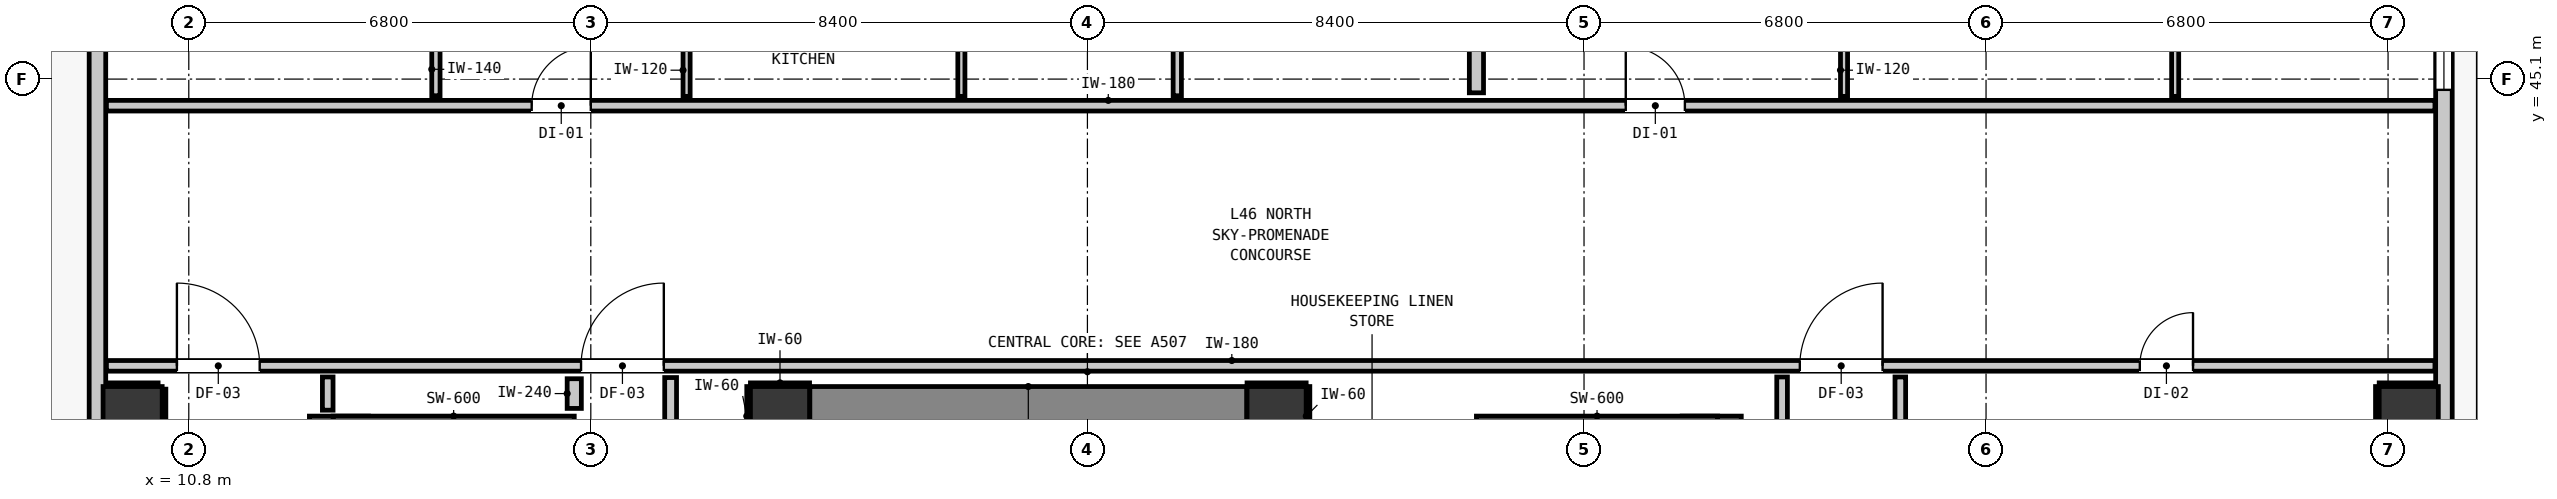
"""IFC4 building model, lengths in metres.
Left out: names, types, materials, properties, quantities, classifications, styles, units other than length and angle.
Written with IfcOpenShell. Run it as: python <this file> out.ifc"""

import sys

from ifc_helpers import new_model, si_unit, direction, frame, frame_2d, origin, origin_2d, place, context, subcontext, project, spatial, rectangle, extrude, element, fill, save


model = new_model("IFC4")
c1 = context("Model", 3, precision=1e-05, world=origin(), true_north=direction((0.0, 1.0)))
c2 = subcontext(c1, "Body", "Model", "MODEL_VIEW")
j1 = project(units=[si_unit("LENGTHUNIT", "METRE"), si_unit("PLANEANGLEUNIT", "RADIAN")], contexts=[c1])
p1 = place(None, origin())
s1 = spatial("IfcSite", under=j1, at=p1, CompositionType="ELEMENT")
p2 = place(p1, origin())
s2 = spatial("IfcBuilding", under=s1, at=p2, CompositionType="ELEMENT")
p3 = place(p2, frame((0.0, 0.0, 159.2)))
s3 = spatial("IfcBuildingStorey", under=s2, at=p3, CompositionType="ELEMENT", Elevation=159.2)
for number, where, z_axis, x_axis in (
    (1, (20.8, 39.4, 0.0), (0.0, 0.0, 1.0), (1.0, 0.0, 0.0)),
    (2, (29.2, 39.4, 0.0), (0.0, 0.0, 1.0), (1.0, 0.0, 0.0)),
):
    element("IfcColumn", number, at=place(p3, frame(where, z_axis=z_axis, x_axis=x_axis)), inside=s3, PredefinedType="COLUMN", context=c2, shape_type="SweptSolid", body=[
        extrude(rectangle(XDim=1.0, YDim=1.0, at=origin_2d()), origin(), (0.0, 0.0, 1.0), 3.32),
    ])
p4 = place(p3, frame((13.34, 31.205, 0.0), z_axis=(0.0, 0.0, 1.0), x_axis=(0.0, 1.0, 0.0)))
e3 = element("IfcWall", 3, at=p4, inside=s3, PredefinedType="SHEAR", context=c2, shape_type="SweptSolid", body=[
    extrude(rectangle(XDim=8.195, YDim=1.0, at=frame_2d((4.097, 0.0))), origin(), (0.0, 0.0, 1.0), 3.32),
])
p5 = place(p3, frame((13.24, 39.1, 0.0), z_axis=(0.0, 0.0, 1.0), x_axis=(1.0, 0.0, 0.0)))
e4 = element("IfcWall", 4, at=p5, inside=s3, PredefinedType="SHEAR", context=c2, shape_type="SweptSolid", body=[
    extrude(rectangle(XDim=4.08, YDim=0.6, at=frame_2d((2.04, 0.0))), origin(), (0.0, 0.0, 1.0), 3.32),
])
p6 = place(p3, frame((36.56, 31.205, 0.0), z_axis=(0.0, 0.0, 1.0), x_axis=(0.0, 1.0, 0.0)))
e5 = element("IfcWall", 5, at=p6, inside=s3, PredefinedType="SHEAR", context=c2, shape_type="SweptSolid", body=[
    extrude(rectangle(XDim=8.195, YDim=1.0, at=frame_2d((4.097, 0.0))), origin(), (0.0, 0.0, 1.0), 3.32),
])
p7 = place(p3, frame((32.58, 39.1, 0.0), z_axis=(0.0, 0.0, 1.0), x_axis=(1.0, 0.0, 0.0)))
e6 = element("IfcWall", 6, at=p7, inside=s3, PredefinedType="SHEAR", context=c2, shape_type="SweptSolid", body=[
    extrude(rectangle(XDim=4.08, YDim=0.6, at=frame_2d((2.04, 0.0))), origin(), (0.0, 0.0, 1.0), 3.32),
])
p8 = place(p3, frame((21.305, 39.4, 0.0), z_axis=(0.0, 0.0, 1.0), x_axis=(1.0, 0.0, 0.0)))
e7 = element("IfcWall", 7, at=p8, inside=s3, PredefinedType="SHEAR", context=c2, shape_type="SweptSolid", body=[
    extrude(rectangle(XDim=7.39, YDim=1.0, at=frame_2d((3.695, 0.0))), origin(), (0.0, 0.0, 1.0), 3.32),
])
for number, where, z_axis, x_axis in (
    (8, (9.85, 39.4, 0.0), (0.0, 0.0, 1.0), (1.0, 0.0, 0.0)),
    (9, (48.35, 39.4, 0.0), (0.0, 0.0, 1.0), (1.0, 0.0, 0.0)),
):
    element("IfcColumn", number, at=place(p3, frame(where, z_axis=z_axis, x_axis=x_axis)), inside=s3, PredefinedType="COLUMN", context=c2, shape_type="SweptSolid", body=[
        extrude(rectangle(XDim=1.0, YDim=1.0, at=origin_2d()), origin(), (0.0, 0.0, 1.0), 3.32),
    ])
p9 = place(p3, frame((9.255, 17.555, 0.0), z_axis=(0.0, 0.0, 1.0), x_axis=(0.0, 1.0, 0.0)))
e10 = element("IfcWall", 10, at=p9, inside=s3, PredefinedType="STANDARD", context=c2, shape_type="SweptSolid", body=[
    extrude(rectangle(XDim=32.29, YDim=0.28, at=frame_2d((16.145, 0.0))), origin(), (0.0, 0.0, 1.0), 3.08),
])
p10 = place(p9, frame((5.467, 0.0, 0.0)))
e11 = element("IfcOpeningElement", 11, at=p10, cuts=e10, PredefinedType="OPENING", context=c2, shape_type="SweptSolid", body=[
    extrude(rectangle(XDim=1.0, YDim=2.15, at=frame_2d((0.5, 1.075))), frame((0.0, 0.15, 0.0), z_axis=(0.0, -1.0, 0.0), x_axis=(1.0, 0.0, 0.0)), (0.0, 0.0, 1.0), 0.3),
])
p11 = place(p9, frame((0.417, 0.0, 0.85)))
e12 = element("IfcOpeningElement", 12, at=p11, cuts=e10, PredefinedType="OPENING", context=c2, shape_type="SweptSolid", body=[
    extrude(rectangle(XDim=1.05, YDim=1.65, at=frame_2d((0.525, 0.825))), frame((0.0, 0.15, 0.0), z_axis=(0.0, -1.0, 0.0), x_axis=(1.0, 0.0, 0.0)), (0.0, 0.0, 1.0), 0.3),
])
p12 = place(p9, frame((30.753, 0.0, 0.85)))
e13 = element("IfcOpeningElement", 13, at=p12, cuts=e10, PredefinedType="OPENING", context=c2, shape_type="SweptSolid", body=[
    extrude(rectangle(XDim=1.05, YDim=1.65, at=frame_2d((0.525, 0.825))), frame((0.0, 0.15, 0.0), z_axis=(0.0, -1.0, 0.0), x_axis=(1.0, 0.0, 0.0)), (0.0, 0.0, 1.0), 0.3),
])
p13 = place(p3, frame((48.945, 49.845, 0.0), z_axis=(0.0, 0.0, 1.0), x_axis=(0.0, -1.0, 0.0)))
e14 = element("IfcWall", 14, at=p13, inside=s3, PredefinedType="STANDARD", context=c2, shape_type="SweptSolid", body=[
    extrude(rectangle(XDim=32.29, YDim=0.28, at=frame_2d((16.145, 0.0))), origin(), (0.0, 0.0, 1.0), 3.08),
])
p14 = place(p13, frame((2.659, 0.0, 0.0)))
e15 = element("IfcOpeningElement", 15, at=p14, cuts=e14, PredefinedType="OPENING", context=c2, shape_type="SweptSolid", body=[
    extrude(rectangle(XDim=1.0, YDim=2.15, at=frame_2d((0.5, 1.075))), frame((0.0, 0.15, 0.0), z_axis=(0.0, -1.0, 0.0), x_axis=(1.0, 0.0, 0.0)), (0.0, 0.0, 1.0), 0.3),
])
p15 = place(p13, frame((30.822, 0.0, 0.85)))
e16 = element("IfcOpeningElement", 16, at=p15, cuts=e14, PredefinedType="OPENING", context=c2, shape_type="SweptSolid", body=[
    extrude(rectangle(XDim=1.05, YDim=1.65, at=frame_2d((0.525, 0.825))), frame((0.0, 0.15, 0.0), z_axis=(0.0, -1.0, 0.0), x_axis=(1.0, 0.0, 0.0)), (0.0, 0.0, 1.0), 0.3),
])
p16 = place(p13, frame((4.027, 0.0, 0.85)))
e17 = element("IfcOpeningElement", 17, at=p16, cuts=e14, PredefinedType="OPENING", context=c2, shape_type="SweptSolid", body=[
    extrude(rectangle(XDim=0.9, YDim=1.5, at=frame_2d((0.45, 0.75))), frame((0.0, 0.15, 0.0), z_axis=(0.0, -1.0, 0.0), x_axis=(1.0, 0.0, 0.0)), (0.0, 0.0, 1.0), 0.3),
])
p17 = place(p13, frame((0.487, 0.0, 0.85)))
e18 = element("IfcOpeningElement", 18, at=p17, cuts=e14, PredefinedType="OPENING", context=c2, shape_type="SweptSolid", body=[
    extrude(rectangle(XDim=1.05, YDim=1.65, at=frame_2d((0.525, 0.825))), frame((0.0, 0.15, 0.0), z_axis=(0.0, -1.0, 0.0), x_axis=(1.0, 0.0, 0.0)), (0.0, 0.0, 1.0), 0.3),
])
p18 = place(p13, frame((21.995, 0.0, 0.85)))
e19 = element("IfcOpeningElement", 19, at=p18, cuts=e14, PredefinedType="OPENING", context=c2, shape_type="SweptSolid", body=[
    extrude(rectangle(XDim=3.0, YDim=2.1, at=frame_2d((1.5, 1.05))), frame((0.0, 0.15, 0.0), z_axis=(0.0, -1.0, 0.0), x_axis=(1.0, 0.0, 0.0)), (0.0, 0.0, 1.0), 0.3),
])
p19 = place(p3, frame((9.407, 40.25, 0.0), z_axis=(0.0, 0.0, 1.0), x_axis=(1.0, 0.0, 0.0)))
e20 = element("IfcWall", 20, at=p19, inside=s3, PredefinedType="PARTITIONING", context=c2, shape_type="SweptSolid", body=[
    extrude(rectangle(XDim=39.386, YDim=0.18, at=frame_2d((19.693, 0.0))), origin(), (0.0, 0.0, 1.0), 3.08),
])
p20 = place(p19, frame((8.028, 0.0, 0.0)))
e21 = element("IfcOpeningElement", 21, at=p20, cuts=e20, PredefinedType="OPENING", context=c2, shape_type="SweptSolid", body=[
    extrude(rectangle(XDim=1.4, YDim=2.15, at=frame_2d((0.7, 1.075))), frame((0.0, 0.1, 0.0), z_axis=(0.0, -1.0, 0.0), x_axis=(1.0, 0.0, 0.0)), (0.0, 0.0, 1.0), 0.2),
])
p21 = place(p19, frame((1.192, 0.0, 0.0)))
e22 = element("IfcOpeningElement", 22, at=p21, cuts=e20, PredefinedType="OPENING", context=c2, shape_type="SweptSolid", body=[
    extrude(rectangle(XDim=1.4, YDim=2.15, at=frame_2d((0.7, 1.075))), frame((0.0, 0.1, 0.0), z_axis=(0.0, -1.0, 0.0), x_axis=(1.0, 0.0, 0.0)), (0.0, 0.0, 1.0), 0.2),
])
p22 = place(p19, frame((28.643, 0.0, 0.0)))
e23 = element("IfcOpeningElement", 23, at=p22, cuts=e20, PredefinedType="OPENING", context=c2, shape_type="SweptSolid", body=[
    extrude(rectangle(XDim=1.4, YDim=2.15, at=frame_2d((0.7, 1.075))), frame((0.0, 0.1, 0.0), z_axis=(0.0, -1.0, 0.0), x_axis=(1.0, 0.0, 0.0)), (0.0, 0.0, 1.0), 0.2),
])
p23 = place(p19, frame((34.394, 0.0, 0.0)))
e24 = element("IfcOpeningElement", 24, at=p23, cuts=e20, PredefinedType="OPENING", context=c2, shape_type="SweptSolid", body=[
    extrude(rectangle(XDim=0.9, YDim=2.1, at=frame_2d((0.45, 1.05))), frame((0.0, 0.1, 0.0), z_axis=(0.0, -1.0, 0.0), x_axis=(1.0, 0.0, 0.0)), (0.0, 0.0, 1.0), 0.2),
])
p24 = place(p3, frame((9.407, 44.65, 0.0), z_axis=(0.0, 0.0, 1.0), x_axis=(1.0, 0.0, 0.0)))
e25 = element("IfcWall", 25, at=p24, inside=s3, PredefinedType="PARTITIONING", context=c2, shape_type="SweptSolid", body=[
    extrude(rectangle(XDim=39.386, YDim=0.18, at=frame_2d((19.693, 0.0))), origin(), (0.0, 0.0, 1.0), 3.08),
])
p25 = place(p24, frame((7.193, 0.0, 0.0)))
e26 = element("IfcOpeningElement", 26, at=p25, cuts=e25, PredefinedType="OPENING", context=c2, shape_type="SweptSolid", body=[
    extrude(rectangle(XDim=1.0, YDim=2.15, at=frame_2d((0.5, 1.075))), frame((0.0, 0.1, 0.0), z_axis=(0.0, -1.0, 0.0), x_axis=(1.0, 0.0, 0.0)), (0.0, 0.0, 1.0), 0.2),
])
p26 = place(p24, frame((25.699, 0.0, 0.0)))
e27 = element("IfcOpeningElement", 27, at=p26, cuts=e25, PredefinedType="OPENING", context=c2, shape_type="SweptSolid", body=[
    extrude(rectangle(XDim=1.0, YDim=2.15, at=frame_2d((0.5, 1.075))), frame((0.0, 0.1, 0.0), z_axis=(0.0, -1.0, 0.0), x_axis=(1.0, 0.0, 0.0)), (0.0, 0.0, 1.0), 0.2),
])
p27 = place(p3, frame((17.32, 39.53, 0.0), z_axis=(0.0, 0.0, 1.0), x_axis=(0.0, 1.0, 0.0)))
e28 = element("IfcWall", 28, at=p27, inside=s3, PredefinedType="PARTITIONING", context=c2, shape_type="SweptSolid", body=[
    extrude(rectangle(XDim=0.502, YDim=0.24, at=frame_2d((0.251, 0.0))), origin(), (0.0, 0.0, 1.0), 3.08),
])
p28 = place(p3, frame((32.58, 44.868, 0.0), z_axis=(0.0, 0.0, 1.0), x_axis=(0.0, 1.0, 0.0)))
e29 = element("IfcWall", 29, at=p28, inside=s3, PredefinedType="PARTITIONING", context=c2, shape_type="SweptSolid", body=[
    extrude(rectangle(XDim=7.125, YDim=0.24, at=frame_2d((3.562, 0.0))), origin(), (0.0, 0.0, 1.0), 3.08),
])
p29 = place(p28, frame((0.945, 0.0, 0.0)))
e30 = element("IfcOpeningElement", 30, at=p29, cuts=e29, PredefinedType="OPENING", context=c2, shape_type="SweptSolid", body=[
    extrude(rectangle(XDim=0.86, YDim=2.02, at=frame_2d((0.43, 1.01))), frame((0.0, 0.13, 0.0), z_axis=(0.0, -1.0, 0.0), x_axis=(1.0, 0.0, 0.0)), (0.0, 0.0, 1.0), 0.26),
])
p30 = place(p28, frame((4.574, 0.0, 0.0)))
e31 = element("IfcOpeningElement", 31, at=p30, cuts=e29, PredefinedType="OPENING", context=c2, shape_type="SweptSolid", body=[
    extrude(rectangle(XDim=0.9, YDim=2.1, at=frame_2d((0.45, 1.05))), frame((0.0, 0.13, 0.0), z_axis=(0.0, -1.0, 0.0), x_axis=(1.0, 0.0, 0.0)), (0.0, 0.0, 1.0), 0.26),
])
p31 = place(p3, frame((18.95, 38.918, 0.0), z_axis=(0.0, 0.0, 1.0), x_axis=(0.0, 1.0, 0.0)))
e32 = element("IfcWall", 32, at=p31, inside=s3, PredefinedType="PARTITIONING", context=c2, shape_type="SweptSolid", body=[
    extrude(rectangle(XDim=1.134, YDim=0.2, at=frame_2d((0.567, 0.0))), origin(), (0.0, 0.0, 1.0), 3.08),
])
p32 = place(p3, frame((13.15, 39.5, 0.0), z_axis=(0.0, 0.0, 1.0), x_axis=(0.0, 1.0, 0.0)))
e33 = element("IfcWall", 33, at=p32, inside=s3, PredefinedType="PARTITIONING", context=c2, shape_type="SweptSolid", body=[
    extrude(rectangle(XDim=0.562, YDim=0.18, at=frame_2d((0.281, 0.0))), origin(), (0.0, 0.0, 1.0), 2.315),
])
p33 = place(p3, frame((37.75, 21.368, 0.0), z_axis=(0.0, 0.0, 1.0), x_axis=(0.0, 1.0, 0.0)))
e34 = element("IfcWall", 34, at=p33, inside=s3, PredefinedType="PARTITIONING", context=c2, shape_type="SweptSolid", body=[
    extrude(rectangle(XDim=18.694, YDim=0.18, at=frame_2d((9.347, 0.0))), origin(), (0.0, 0.0, 1.0), 3.08),
])
p34 = place(p3, frame((39.75, 36.238, 0.0), z_axis=(0.0, 0.0, 1.0), x_axis=(0.0, 1.0, 0.0)))
e35 = element("IfcWall", 35, at=p34, inside=s3, PredefinedType="PARTITIONING", context=c2, shape_type="SweptSolid", body=[
    extrude(rectangle(XDim=3.824, YDim=0.18, at=frame_2d((1.912, 0.0))), origin(), (0.0, 0.0, 1.0), 3.08),
])
p35 = place(p3, frame((14.98, 44.818, 0.0), z_axis=(0.0, 0.0, 1.0), x_axis=(0.0, 1.0, 0.0)))
e36 = element("IfcWall", 36, at=p35, inside=s3, PredefinedType="PARTITIONING", context=c2, shape_type="SweptSolid", body=[
    extrude(rectangle(XDim=2.844, YDim=0.14, at=frame_2d((1.422, 0.0))), origin(), (0.0, 0.0, 1.0), 3.08),
])
p36 = place(p35, frame((0.995, 0.0, 0.0)))
e37 = element("IfcOpeningElement", 37, at=p36, cuts=e36, PredefinedType="OPENING", context=c2, shape_type="SweptSolid", body=[
    extrude(rectangle(XDim=0.86, YDim=2.02, at=frame_2d((0.43, 1.01))), frame((0.0, 0.08, 0.0), z_axis=(0.0, -1.0, 0.0), x_axis=(1.0, 0.0, 0.0)), (0.0, 0.0, 1.0), 0.16),
])
p37 = place(p3, frame((27.52, 44.818, 0.0), z_axis=(0.0, 0.0, 1.0), x_axis=(0.0, 1.0, 0.0)))
e38 = element("IfcWall", 38, at=p37, inside=s3, PredefinedType="PARTITIONING", context=c2, shape_type="SweptSolid", body=[
    extrude(rectangle(XDim=2.844, YDim=0.14, at=frame_2d((1.422, 0.0))), origin(), (0.0, 0.0, 1.0), 3.08),
])
p38 = place(p3, frame((19.22, 44.808, 0.0), z_axis=(0.0, 0.0, 1.0), x_axis=(0.0, 1.0, 0.0)))
e39 = element("IfcWall", 39, at=p38, inside=s3, PredefinedType="PARTITIONING", context=c2, shape_type="SweptSolid", body=[
    extrude(rectangle(XDim=2.864, YDim=0.12, at=frame_2d((1.432, 0.0))), origin(), (0.0, 0.0, 1.0), 3.08),
])
p39 = place(p38, frame((0.985, 0.0, 0.0)))
e40 = element("IfcOpeningElement", 40, at=p39, cuts=e39, PredefinedType="OPENING", context=c2, shape_type="SweptSolid", body=[
    extrude(rectangle(XDim=0.9, YDim=2.1, at=frame_2d((0.45, 1.05))), frame((0.0, 0.07, 0.0), z_axis=(0.0, -1.0, 0.0), x_axis=(1.0, 0.0, 0.0)), (0.0, 0.0, 1.0), 0.14),
])
p40 = place(p3, frame((23.868, 44.808, 0.0), z_axis=(0.0, 0.0, 1.0), x_axis=(0.0, 1.0, 0.0)))
e41 = element("IfcWall", 41, at=p40, inside=s3, PredefinedType="PARTITIONING", context=c2, shape_type="SweptSolid", body=[
    extrude(rectangle(XDim=2.864, YDim=0.12, at=frame_2d((1.432, 0.0))), origin(), (0.0, 0.0, 1.0), 3.08),
])
p41 = place(p40, frame((0.972, 0.0, 0.0)))
e42 = element("IfcOpeningElement", 42, at=p41, cuts=e41, PredefinedType="OPENING", context=c2, shape_type="SweptSolid", body=[
    extrude(rectangle(XDim=0.9, YDim=2.1, at=frame_2d((0.45, 1.05))), frame((0.0, 0.07, 0.0), z_axis=(0.0, -1.0, 0.0), x_axis=(1.0, 0.0, 0.0)), (0.0, 0.0, 1.0), 0.14),
])
p42 = place(p3, frame((38.798, 44.808, 0.0), z_axis=(0.0, 0.0, 1.0), x_axis=(0.0, 1.0, 0.0)))
e43 = element("IfcWall", 43, at=p42, inside=s3, PredefinedType="PARTITIONING", context=c2, shape_type="SweptSolid", body=[
    extrude(rectangle(XDim=2.864, YDim=0.12, at=frame_2d((1.432, 0.0))), origin(), (0.0, 0.0, 1.0), 3.08),
])
p43 = place(p42, frame((0.985, 0.0, 0.0)))
e44 = element("IfcOpeningElement", 44, at=p43, cuts=e43, PredefinedType="OPENING", context=c2, shape_type="SweptSolid", body=[
    extrude(rectangle(XDim=0.9, YDim=2.1, at=frame_2d((0.45, 1.05))), frame((0.0, 0.07, 0.0), z_axis=(0.0, -1.0, 0.0), x_axis=(1.0, 0.0, 0.0)), (0.0, 0.0, 1.0), 0.14),
])
p44 = place(p3, frame((44.399, 44.808, 0.0), z_axis=(0.0, 0.0, 1.0), x_axis=(0.0, 1.0, 0.0)))
e45 = element("IfcWall", 45, at=p44, inside=s3, PredefinedType="PARTITIONING", context=c2, shape_type="SweptSolid", body=[
    extrude(rectangle(XDim=2.864, YDim=0.12, at=frame_2d((1.432, 0.0))), origin(), (0.0, 0.0, 1.0), 3.08),
])
p45 = place(p44, frame((0.972, 0.0, 0.0)))
e46 = element("IfcOpeningElement", 46, at=p45, cuts=e45, PredefinedType="OPENING", context=c2, shape_type="SweptSolid", body=[
    extrude(rectangle(XDim=0.9, YDim=2.1, at=frame_2d((0.45, 1.05))), frame((0.0, 0.07, 0.0), z_axis=(0.0, -1.0, 0.0), x_axis=(1.0, 0.0, 0.0)), (0.0, 0.0, 1.0), 0.14),
])
for number, where, z_axis, x_axis in (
    (47, (20.3, 39.932, 0.0), (0.0, 0.0, 1.0), (1.0, 0.0, 0.0)),
    (48, (20.268, 38.9, 0.0), (0.0, 0.0, 1.0), (0.0, 1.0, 0.0)),
    (49, (28.7, 39.932, 0.0), (0.0, 0.0, 1.0), (1.0, 0.0, 0.0)),
    (50, (29.732, 38.9, 0.0), (0.0, 0.0, 1.0), (0.0, 1.0, 0.0)),
):
    element("IfcWall", number, at=place(p3, frame(where, z_axis=z_axis, x_axis=x_axis)), inside=s3, PredefinedType="PARTITIONING", context=c2, shape_type="SweptSolid", body=[
        extrude(rectangle(XDim=1.0, YDim=0.06, at=frame_2d((0.5, 0.0))), origin(), (0.0, 0.0, 1.0), 1.45),
    ])
p46 = place(p3, frame((9.41, 39.932, 0.0), z_axis=(0.0, 0.0, 1.0), x_axis=(1.0, 0.0, 0.0)))
e51 = element("IfcWall", 51, at=p46, inside=s3, PredefinedType="PARTITIONING", context=c2, shape_type="SweptSolid", body=[
    extrude(rectangle(XDim=0.871, YDim=0.06, at=frame_2d((0.436, 0.0))), origin(), (0.0, 0.0, 1.0), 1.45),
])
p47 = place(p3, frame((10.382, 38.9, 0.0), z_axis=(0.0, 0.0, 1.0), x_axis=(0.0, 1.0, 0.0)))
e52 = element("IfcWall", 52, at=p47, inside=s3, PredefinedType="PARTITIONING", context=c2, shape_type="SweptSolid", body=[
    extrude(rectangle(XDim=0.956, YDim=0.06, at=frame_2d((0.478, 0.0))), origin(), (0.0, 0.0, 1.0), 1.45),
])
p48 = place(p3, frame((47.85, 39.932, 0.0), z_axis=(0.0, 0.0, 1.0), x_axis=(1.0, 0.0, 0.0)))
e53 = element("IfcWall", 53, at=p48, inside=s3, PredefinedType="PARTITIONING", context=c2, shape_type="SweptSolid", body=[
    extrude(rectangle(XDim=0.94, YDim=0.06, at=frame_2d((0.47, 0.0))), origin(), (0.0, 0.0, 1.0), 1.45),
])
p49 = place(p3, frame((47.818, 38.9, 0.0), z_axis=(0.0, 0.0, 1.0), x_axis=(0.0, 1.0, 0.0)))
e54 = element("IfcWall", 54, at=p49, inside=s3, PredefinedType="PARTITIONING", context=c2, shape_type="SweptSolid", body=[
    extrude(rectangle(XDim=1.0, YDim=0.06, at=frame_2d((0.5, 0.0))), origin(), (0.0, 0.0, 1.0), 1.45),
])
p50 = place(p16, origin())
e55 = element("IfcWindow", 55, at=p50, inside=s3, PartitioningType="SINGLE_PANEL", PredefinedType="WINDOW", context=c2, shape_type="SweptSolid", body=[
    extrude(rectangle(XDim=0.9, YDim=1.5, at=frame_2d((0.45, 0.75))), frame((0.0, 0.03, 0.0), z_axis=(0.0, -1.0, 0.0), x_axis=(1.0, 0.0, 0.0)), (0.0, 0.0, 1.0), 0.06),
])
fill(e17, e55)
p51 = place(p20, origin())
e56 = element("IfcDoor", 56, at=p51, inside=s3, OperationType="SINGLE_SWING_RIGHT", PredefinedType="DOOR", context=c2, shape_type="SweptSolid", body=[
    extrude(rectangle(XDim=1.4, YDim=2.15, at=frame_2d((0.7, 1.075))), frame((0.0, 0.025, 0.0), z_axis=(0.0, -1.0, 0.0), x_axis=(1.0, 0.0, 0.0)), (0.0, 0.0, 1.0), 0.05),
])
fill(e21, e56)
p52 = place(p21, origin())
e57 = element("IfcDoor", 57, at=p52, inside=s3, OperationType="SINGLE_SWING_LEFT", PredefinedType="DOOR", context=c2, shape_type="SweptSolid", body=[
    extrude(rectangle(XDim=1.4, YDim=2.15, at=frame_2d((0.7, 1.075))), frame((0.0, 0.025, 0.0), z_axis=(0.0, -1.0, 0.0), x_axis=(1.0, 0.0, 0.0)), (0.0, 0.0, 1.0), 0.05),
])
fill(e22, e57)
p53 = place(p22, origin())
e58 = element("IfcDoor", 58, at=p53, inside=s3, OperationType="SINGLE_SWING_RIGHT", PredefinedType="DOOR", context=c2, shape_type="SweptSolid", body=[
    extrude(rectangle(XDim=1.4, YDim=2.15, at=frame_2d((0.7, 1.075))), frame((0.0, 0.025, 0.0), z_axis=(0.0, -1.0, 0.0), x_axis=(1.0, 0.0, 0.0)), (0.0, 0.0, 1.0), 0.05),
])
fill(e23, e58)
p54 = place(p25, origin())
e59 = element("IfcDoor", 59, at=p54, inside=s3, OperationType="SINGLE_SWING_RIGHT", PredefinedType="DOOR", context=c2, shape_type="SweptSolid", body=[
    extrude(rectangle(XDim=1.0, YDim=2.15, at=frame_2d((0.5, 1.075))), frame((0.0, 0.025, 0.0), z_axis=(0.0, -1.0, 0.0), x_axis=(1.0, 0.0, 0.0)), (0.0, 0.0, 1.0), 0.05),
])
fill(e26, e59)
p55 = place(p26, origin())
e60 = element("IfcDoor", 60, at=p55, inside=s3, OperationType="SINGLE_SWING_LEFT", PredefinedType="DOOR", context=c2, shape_type="SweptSolid", body=[
    extrude(rectangle(XDim=1.0, YDim=2.15, at=frame_2d((0.5, 1.075))), frame((0.0, 0.025, 0.0), z_axis=(0.0, -1.0, 0.0), x_axis=(1.0, 0.0, 0.0)), (0.0, 0.0, 1.0), 0.05),
])
fill(e27, e60)
p56 = place(p23, origin())
e61 = element("IfcDoor", 61, at=p56, inside=s3, OperationType="SINGLE_SWING_RIGHT", PredefinedType="DOOR", context=c2, shape_type="SweptSolid", body=[
    extrude(rectangle(XDim=0.9, YDim=2.1, at=frame_2d((0.45, 1.05))), frame((0.0, 0.025, 0.0), z_axis=(0.0, -1.0, 0.0), x_axis=(1.0, 0.0, 0.0)), (0.0, 0.0, 1.0), 0.05),
])
fill(e24, e61)
save(model, sys.argv[1])
